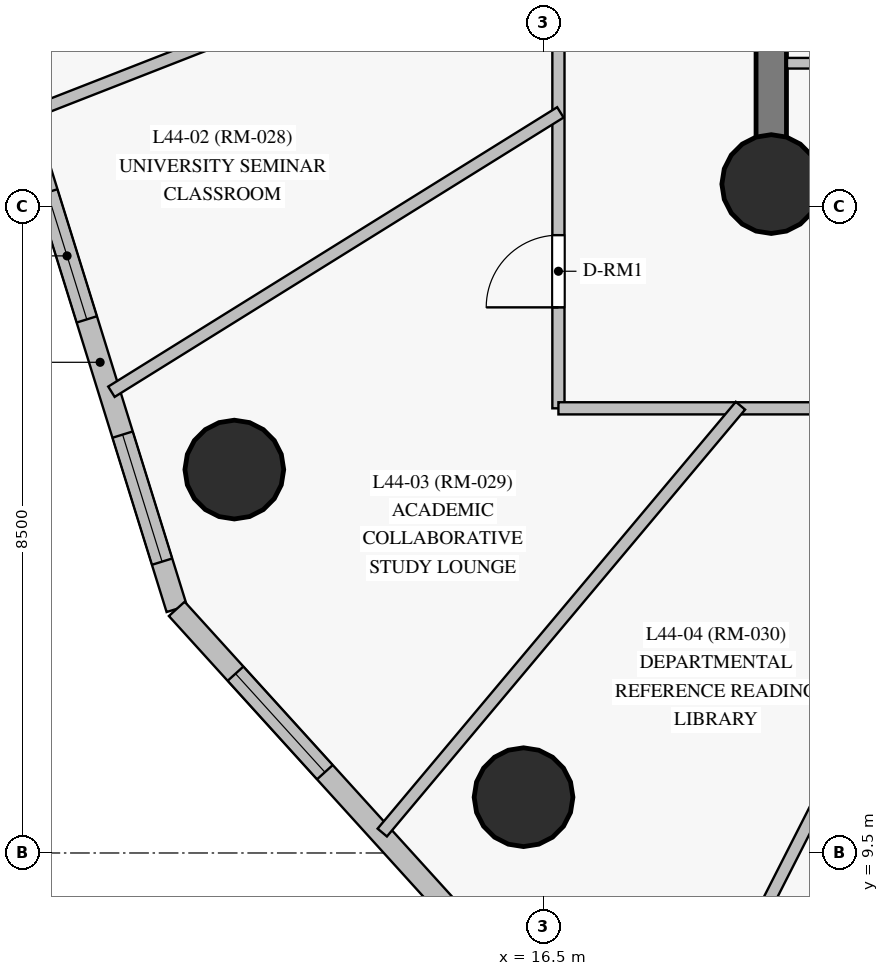
"""IFC4 building model, lengths in metres.
Left out: names, types, materials, properties, quantities, classifications, styles, units other than length and angle.
Written with IfcOpenShell. Run it as: python <this file> out.ifc"""

import sys

from ifc_helpers import new_model, si_unit, direction, frame, frame_2d, origin, origin_with_axes, origin_2d, place, context, subcontext, project, spatial, rectangle, circle, extrude, source, transform, mapped, element, fill, save


model = new_model("IFC4")
c1 = context("Model", 3, precision=1e-05, world=origin(), true_north=direction((0.0, 1.0)))
c2 = subcontext(c1, "Body", "Model", "MODEL_VIEW")
j1 = project(units=[si_unit("LENGTHUNIT", "METRE"), si_unit("PLANEANGLEUNIT", "RADIAN")], contexts=[c1])
p1 = place(None, origin())
s1 = spatial("IfcSite", under=j1, at=p1, CompositionType="ELEMENT")
p2 = place(p1, origin())
s2 = spatial("IfcBuilding", under=s1, at=p2, CompositionType="ELEMENT")
p3 = place(p2, frame((0.0, 0.0, 156.55)))
s3 = spatial("IfcBuildingStorey", under=s2, at=p3, CompositionType="ELEMENT", Elevation=156.55)
p4 = place(p3, frame((19.5, 18.3, 0.0), z_axis=(0.0, 0.0, 1.0), x_axis=(1.0, 0.0, 0.0)))
e1 = element("IfcWall", 1, at=p4, inside=s3, PredefinedType="SHEAR", context=c2, shape_type="SweptSolid", body=[
    extrude(rectangle(XDim=7.05, YDim=0.4, at=frame_2d((3.525, 0.0))), origin(), (0.0, 0.0, 1.0), 2.825),
])
p5 = place(p4, frame((4.2, 0.0, 0.0)))
e2 = element("IfcOpeningElement", 2, at=p5, cuts=e1, PredefinedType="OPENING", context=c2, shape_type="SweptSolid", body=[
    extrude(rectangle(XDim=1.4, YDim=2.2, at=frame_2d((0.7, 1.1))), frame((0.0, 0.21, 0.0), z_axis=(0.0, -1.0, 0.0), x_axis=(1.0, 0.0, 0.0)), (0.0, 0.0, 1.0), 0.42),
])
p6 = place(p3, frame((19.5, 34.7, 0.0), z_axis=(0.0, 0.0, 1.0), x_axis=(0.0, -1.0, 0.0)))
e3 = element("IfcWall", 3, at=p6, inside=s3, PredefinedType="SHEAR", context=c2, shape_type="SweptSolid", body=[
    extrude(rectangle(XDim=16.4, YDim=0.4, at=frame_2d((8.2, 0.0))), origin(), (0.0, 0.0, 1.0), 2.825),
])
p7 = place(p6, frame((3.1, 0.0, 0.0)))
e4 = element("IfcOpeningElement", 4, at=p7, cuts=e3, PredefinedType="OPENING", context=c2, shape_type="SweptSolid", body=[
    extrude(rectangle(XDim=1.1, YDim=2.15, at=frame_2d((0.55, 1.075))), frame((0.0, 0.21, 0.0), z_axis=(0.0, -1.0, 0.0), x_axis=(1.0, 0.0, 0.0)), (0.0, 0.0, 1.0), 0.42),
])
m1 = source(origin_with_axes(), c2, "Body", "SweptSolid", [
    extrude(circle(Radius=0.65, at=origin_2d()), origin(), (0.0, 0.0, 1.0), 3.05),
])
for number, where, z_axis, x_axis in (
    (5, (19.5, 18.3, 0.0), (0.0, 0.0, 1.0), (1.0, 0.0, 0.0)),
    (6, (12.436, 14.544, 0.0), (0.0, 0.0, 1.0), (1.0, 0.0, 0.0)),
    (7, (16.241, 10.234, 0.0), (0.0, 0.0, 1.0), (1.0, 0.0, 0.0)),
):
    element("IfcColumn", number, at=place(p3, frame(where, z_axis=z_axis, x_axis=x_axis)), inside=s3, PredefinedType="COLUMN", context=c2, shape_type="MappedRepresentation", body=[
        mapped(m1, transform((0.0, 0.0, 0.0), scale=1.0)),
    ])
p8 = place(p3, frame((9.662, 19.2, 0.0), z_axis=(0.0, 0.0, 1.0), x_axis=(0.2968015378, -0.954939185058, 0.0)))
e8 = element("IfcWall", 8, at=p8, inside=s3, PredefinedType="SOLIDWALL", context=c2, shape_type="SweptSolid", body=[
    extrude(rectangle(XDim=6.794, YDim=0.28, at=frame_2d((3.397, 0.0))), origin(), (0.0, 0.0, 1.0), 2.825),
])
p9 = place(p8, frame((1.056, 0.0, 0.85)))
e9 = element("IfcOpeningElement", 9, at=p9, cuts=e8, PredefinedType="OPENING", context=c2, shape_type="SweptSolid", body=[
    extrude(rectangle(XDim=1.75, YDim=1.65, at=frame_2d((0.875, 0.825))), frame((0.0, 0.15, 0.0), z_axis=(0.0, -1.0, 0.0), x_axis=(1.0, 0.0, 0.0)), (0.0, 0.0, 1.0), 0.3),
])
p10 = place(p8, frame((4.393, 0.0, 0.85)))
e10 = element("IfcOpeningElement", 10, at=p10, cuts=e8, PredefinedType="OPENING", context=c2, shape_type="SweptSolid", body=[
    extrude(rectangle(XDim=1.75, YDim=1.65, at=frame_2d((0.875, 0.825))), frame((0.0, 0.15, 0.0), z_axis=(0.0, -1.0, 0.0), x_axis=(1.0, 0.0, 0.0)), (0.0, 0.0, 1.0), 0.3),
])
p11 = place(p3, frame((11.679, 12.711, 0.0), z_axis=(0.0, 0.0, 1.0), x_axis=(0.671864956499, -0.740673666488, 0.0)))
e11 = element("IfcWall", 11, at=p11, inside=s3, PredefinedType="SOLIDWALL", context=c2, shape_type="SweptSolid", body=[
    extrude(rectangle(XDim=9.466, YDim=0.28, at=frame_2d((4.733, 0.0))), origin(), (0.0, 0.0, 1.0), 2.825),
])
p12 = place(p11, frame((1.151, 0.0, 0.85)))
e12 = element("IfcOpeningElement", 12, at=p12, cuts=e11, PredefinedType="OPENING", context=c2, shape_type="SweptSolid", body=[
    extrude(rectangle(XDim=1.75, YDim=1.65, at=frame_2d((0.875, 0.825))), frame((0.0, 0.15, 0.0), z_axis=(0.0, -1.0, 0.0), x_axis=(1.0, 0.0, 0.0)), (0.0, 0.0, 1.0), 0.3),
])
p13 = place(p11, frame((5.754, 0.0, 0.85)))
e13 = element("IfcOpeningElement", 13, at=p13, cuts=e11, PredefinedType="OPENING", context=c2, shape_type="SweptSolid", body=[
    extrude(rectangle(XDim=1.75, YDim=1.65, at=frame_2d((0.875, 0.825))), frame((0.0, 0.15, 0.0), z_axis=(0.0, -1.0, 0.0), x_axis=(1.0, 0.0, 0.0)), (0.0, 0.0, 1.0), 0.3),
])
p14 = place(p3, frame((14.666, 41.223, 0.0), z_axis=(0.0, 0.0, 1.0), x_axis=(-0.221558962352, -0.975146976718, 0.0)))
e14 = element("IfcWall", 14, at=p14, inside=s3, PredefinedType="SOLIDWALL", context=c2, shape_type="SweptSolid", body=[
    extrude(rectangle(XDim=22.585, YDim=0.28, at=frame_2d((11.292, 0.0))), origin(), (0.0, 0.0, 1.0), 2.825),
])
p15 = place(p14, frame((2.656, 0.0, 0.85)))
e15 = element("IfcOpeningElement", 15, at=p15, cuts=e14, PredefinedType="OPENING", context=c2, shape_type="SweptSolid", body=[
    extrude(rectangle(XDim=1.75, YDim=1.65, at=frame_2d((0.875, 0.825))), frame((0.0, 0.15, 0.0), z_axis=(0.0, -1.0, 0.0), x_axis=(1.0, 0.0, 0.0)), (0.0, 0.0, 1.0), 0.3),
])
p16 = place(p14, frame((7.15, 0.0, 0.85)))
e16 = element("IfcOpeningElement", 16, at=p16, cuts=e14, PredefinedType="OPENING", context=c2, shape_type="SweptSolid", body=[
    extrude(rectangle(XDim=1.75, YDim=1.65, at=frame_2d((0.875, 0.825))), frame((0.0, 0.15, 0.0), z_axis=(0.0, -1.0, 0.0), x_axis=(1.0, 0.0, 0.0)), (0.0, 0.0, 1.0), 0.3),
])
p17 = place(p14, frame((11.643, 0.0, 0.85)))
e17 = element("IfcOpeningElement", 17, at=p17, cuts=e14, PredefinedType="OPENING", context=c2, shape_type="SweptSolid", body=[
    extrude(rectangle(XDim=1.75, YDim=1.65, at=frame_2d((0.875, 0.825))), frame((0.0, 0.15, 0.0), z_axis=(0.0, -1.0, 0.0), x_axis=(1.0, 0.0, 0.0)), (0.0, 0.0, 1.0), 0.3),
])
p18 = place(p14, frame((17.93, 0.0, 0.85)))
e18 = element("IfcOpeningElement", 18, at=p18, cuts=e14, PredefinedType="OPENING", context=c2, shape_type="SweptSolid", body=[
    extrude(rectangle(XDim=1.75, YDim=1.65, at=frame_2d((0.875, 0.825))), frame((0.0, 0.15, 0.0), z_axis=(0.0, -1.0, 0.0), x_axis=(1.0, 0.0, 0.0)), (0.0, 0.0, 1.0), 0.3),
])
p19 = place(p14, frame((9.826, 0.0, 0.0)))
e19 = element("IfcOpeningElement", 19, at=p19, cuts=e14, PredefinedType="OPENING", context=c2, shape_type="SweptSolid", body=[
    extrude(rectangle(XDim=1.05, YDim=2.12, at=frame_2d((0.525, 1.06))), frame((0.0, 0.15, 0.0), z_axis=(0.0, -1.0, 0.0), x_axis=(1.0, 0.0, 0.0)), (0.0, 0.0, 1.0), 0.3),
])
p20 = place(p3, frame((16.7, 15.35, 0.0), z_axis=(0.0, 0.0, 1.0), x_axis=(0.0, 1.0, 0.0)))
e20 = element("IfcWall", 20, at=p20, inside=s3, PredefinedType="PARTITIONING", context=c2, shape_type="SweptSolid", body=[
    extrude(rectangle(XDim=22.3, YDim=0.16, at=frame_2d((11.15, 0.0))), origin(), (0.0, 0.0, 1.0), 2.275),
])
p21 = place(p20, frame((7.33, 0.0, 0.0)))
e21 = element("IfcOpeningElement", 21, at=p21, cuts=e20, PredefinedType="OPENING", context=c2, shape_type="SweptSolid", body=[
    extrude(rectangle(XDim=0.95, YDim=2.15, at=frame_2d((0.475, 1.075))), frame((0.0, 0.09, 0.0), z_axis=(0.0, -1.0, 0.0), x_axis=(1.0, 0.0, 0.0)), (0.0, 0.0, 1.0), 0.18),
])
p22 = place(p20, frame((5.1, 0.0, 0.0)))
e22 = element("IfcOpeningElement", 22, at=p22, cuts=e20, PredefinedType="OPENING", context=c2, shape_type="SweptSolid", body=[
    extrude(rectangle(XDim=0.96, YDim=2.15, at=frame_2d((0.48, 1.075))), frame((0.0, 0.09, 0.0), z_axis=(0.0, -1.0, 0.0), x_axis=(1.0, 0.0, 0.0)), (0.0, 0.0, 1.0), 0.18),
])
p23 = place(p20, frame((1.328, 0.0, 0.0)))
e23 = element("IfcOpeningElement", 23, at=p23, cuts=e20, PredefinedType="OPENING", context=c2, shape_type="SweptSolid", body=[
    extrude(rectangle(XDim=0.95, YDim=2.15, at=frame_2d((0.475, 1.075))), frame((0.0, 0.09, 0.0), z_axis=(0.0, -1.0, 0.0), x_axis=(1.0, 0.0, 0.0)), (0.0, 0.0, 1.0), 0.18),
])
p24 = place(p20, frame((14.02, 0.0, 0.0)))
e24 = element("IfcOpeningElement", 24, at=p24, cuts=e20, PredefinedType="OPENING", context=c2, shape_type="SweptSolid", body=[
    extrude(rectangle(XDim=0.95, YDim=2.15, at=frame_2d((0.475, 1.075))), frame((0.0, 0.09, 0.0), z_axis=(0.0, -1.0, 0.0), x_axis=(1.0, 0.0, 0.0)), (0.0, 0.0, 1.0), 0.18),
])
p25 = place(p3, frame((27.55, 15.35, 0.0), z_axis=(0.0, 0.0, 1.0), x_axis=(-1.0, 0.0, 0.0)))
e25 = element("IfcWall", 25, at=p25, inside=s3, PredefinedType="PARTITIONING", context=c2, shape_type="SweptSolid", body=[
    extrude(rectangle(XDim=10.85, YDim=0.16, at=frame_2d((5.425, 0.0))), origin(), (0.0, 0.0, 1.0), 2.375),
])
p26 = place(p25, frame((5.24, 0.0, 0.0)))
e26 = element("IfcOpeningElement", 26, at=p26, cuts=e25, PredefinedType="OPENING", context=c2, shape_type="SweptSolid", body=[
    extrude(rectangle(XDim=0.95, YDim=2.15, at=frame_2d((0.475, 1.075))), frame((0.0, 0.09, 0.0), z_axis=(0.0, -1.0, 0.0), x_axis=(1.0, 0.0, 0.0)), (0.0, 0.0, 1.0), 0.18),
])
p27 = place(p25, frame((3.323, 0.0, 0.0)))
e27 = element("IfcOpeningElement", 27, at=p27, cuts=e25, PredefinedType="OPENING", context=c2, shape_type="SweptSolid", body=[
    extrude(rectangle(XDim=0.95, YDim=2.15, at=frame_2d((0.475, 1.075))), frame((0.0, 0.09, 0.0), z_axis=(0.0, -1.0, 0.0), x_axis=(1.0, 0.0, 0.0)), (0.0, 0.0, 1.0), 0.18),
])
p28 = place(p3, frame((22.782, 15.39, 0.0), z_axis=(0.0, 0.0, 1.0), x_axis=(-0.453312470981, -0.891351672267, 0.0)))
e28 = element("IfcWall", 28, at=p28, inside=s3, PredefinedType="PARTITIONING", context=c2, shape_type="SweptSolid", body=[
    extrude(rectangle(XDim=10.694, YDim=0.16, at=frame_2d((5.347, 0.0))), origin(), (0.0, 0.0, 1.0), 2.825),
])
p29 = place(p3, frame((16.742, 21.968, 0.0), z_axis=(0.0, 0.0, 1.0), x_axis=(-0.931359979556, -0.364099695799, 0.0)))
e29 = element("IfcWall", 29, at=p29, inside=s3, PredefinedType="PARTITIONING", context=c2, shape_type="SweptSolid", body=[
    extrude(rectangle(XDim=7.558, YDim=0.16, at=frame_2d((3.779, 0.0))), origin(), (0.0, 0.0, 1.0), 2.825),
])
p30 = place(p3, frame((19.094, 15.385, 0.0), z_axis=(0.0, 0.0, 1.0), x_axis=(-0.642788201526, -0.766043946506, 0.0)))
e30 = element("IfcWall", 30, at=p30, inside=s3, PredefinedType="PARTITIONING", context=c2, shape_type="SweptSolid", body=[
    extrude(rectangle(XDim=7.331, YDim=0.16, at=frame_2d((3.666, 0.0))), origin(), (0.0, 0.0, 1.0), 2.275),
])
p31 = place(p3, frame((16.726, 19.243, 0.0), z_axis=(0.0, 0.0, 1.0), x_axis=(-0.849037712217, -0.528332247012, 0.0)))
e31 = element("IfcWall", 31, at=p31, inside=s3, PredefinedType="PARTITIONING", context=c2, shape_type="SweptSolid", body=[
    extrude(rectangle(XDim=6.956, YDim=0.16, at=frame_2d((3.478, 0.0))), origin(), (0.0, 0.0, 1.0), 2.825),
])
p32 = place(p3, frame((19.707, 19.89, 0.0), z_axis=(0.0, 0.0, 1.0), x_axis=(1.0, 0.0, 0.0)))
e32 = element("IfcWall", 32, at=p32, inside=s3, PredefinedType="PARTITIONING", context=c2, shape_type="SweptSolid", body=[
    extrude(rectangle(XDim=3.79, YDim=0.14, at=frame_2d((1.895, 0.0))), origin(), (0.0, 0.0, 1.0), 2.825),
])
m2 = source(origin_with_axes(), c2, "Body", "SweptSolid", [
    extrude(rectangle(XDim=1.75, YDim=1.65, at=frame_2d((0.875, 0.825))), frame((0.0, 0.03, 0.0), z_axis=(0.0, -1.0, 0.0), x_axis=(1.0, 0.0, 0.0)), (0.0, 0.0, 1.0), 0.06),
])
p33 = place(p9, origin())
e33 = element("IfcWindow", 33, at=p33, inside=s3, PartitioningType="SINGLE_PANEL", PredefinedType="WINDOW", context=c2, shape_type="MappedRepresentation", body=[
    mapped(m2, transform((0.0, 0.0, 0.0), scale=1.0)),
])
fill(e9, e33)
p34 = place(p10, origin())
e34 = element("IfcWindow", 34, at=p34, inside=s3, PartitioningType="SINGLE_PANEL", PredefinedType="WINDOW", context=c2, shape_type="MappedRepresentation", body=[
    mapped(m2, transform((0.0, 0.0, 0.0), scale=1.0)),
])
fill(e10, e34)
p35 = place(p12, origin())
e35 = element("IfcWindow", 35, at=p35, inside=s3, PartitioningType="SINGLE_PANEL", PredefinedType="WINDOW", context=c2, shape_type="MappedRepresentation", body=[
    mapped(m2, transform((0.0, 0.0, 0.0), scale=1.0)),
])
fill(e12, e35)
m3 = source(origin_with_axes(), c2, "Body", "SweptSolid", [
    extrude(rectangle(XDim=0.95, YDim=2.15, at=frame_2d((0.475, 1.075))), frame((0.0, 0.025, 0.0), z_axis=(0.0, -1.0, 0.0), x_axis=(1.0, 0.0, 0.0)), (0.0, 0.0, 1.0), 0.05),
])
p36 = place(p23, origin())
e36 = element("IfcDoor", 36, at=p36, inside=s3, OperationType="SINGLE_SWING_LEFT", PredefinedType="DOOR", context=c2, shape_type="MappedRepresentation", body=[
    mapped(m3, transform((0.0, 0.0, 0.0), scale=1.0)),
])
fill(e23, e36)
save(model, sys.argv[1])
